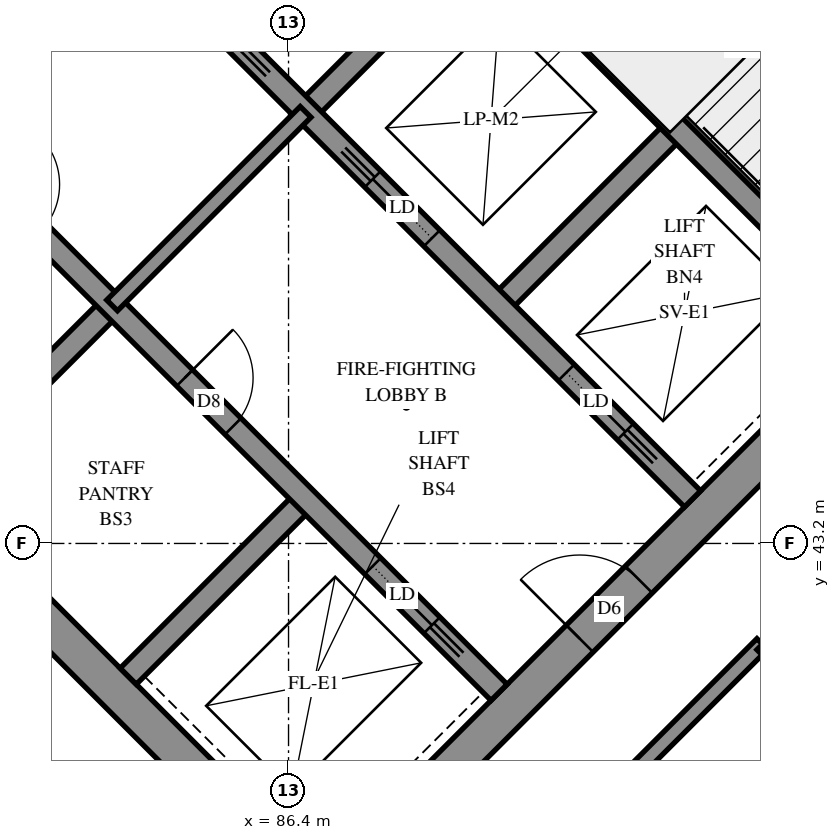
"""IFC4 building model, lengths in metres.
Left out: names, types, materials, properties, quantities, classifications, styles, units other than length and angle.
Written with IfcOpenShell. Run it as: python <this file> out.ifc"""

import sys

from ifc_helpers import new_model, si_unit, direction, frame, frame_2d, origin, place, context, subcontext, project, spatial, rectangle, extrude, element, fill, save


model = new_model("IFC4")
c1 = context("Model", 3, precision=1e-05, world=origin(), true_north=direction((0.0, 1.0)))
c2 = subcontext(c1, "Body", "Model", "MODEL_VIEW")
j1 = project(units=[si_unit("LENGTHUNIT", "METRE"), si_unit("PLANEANGLEUNIT", "RADIAN")], contexts=[c1])
p1 = place(None, origin())
s1 = spatial("IfcSite", under=j1, at=p1, CompositionType="ELEMENT")
p2 = place(p1, origin())
s2 = spatial("IfcBuilding", under=s1, at=p2, CompositionType="ELEMENT")
p3 = place(p2, frame((0.0, 0.0, 189.6)))
s3 = spatial("IfcBuildingStorey", under=s2, at=p3, CompositionType="ELEMENT", Elevation=189.6)
p4 = place(p3, frame((76.124, 49.267, -0.3), z_axis=(0.0, 0.0, 1.0), x_axis=(0.7071067812, -0.7071067812, 0.0)))
e1 = element("IfcWall", 1, at=p4, inside=s3, PredefinedType="SHEAR", context=c2, shape_type="SweptSolid", body=[
    extrude(rectangle(XDim=15.4, YDim=0.5, at=frame_2d((7.7, 0.0))), origin(), (0.0, 0.0, 1.0), 2.7),
])
p5 = place(p3, frame((86.66, 59.802, -0.3), z_axis=(0.0, 0.0, 1.0), x_axis=(0.7071067812, -0.7071067812, 0.0)))
e2 = element("IfcWall", 2, at=p5, inside=s3, PredefinedType="SHEAR", context=c2, shape_type="SweptSolid", body=[
    extrude(rectangle(XDim=15.4, YDim=0.5, at=frame_2d((7.7, 0.0))), origin(), (0.0, 0.0, 1.0), 2.7),
])
p6 = place(p5, frame((10.5, 0.0, 0.3)))
e3 = element("IfcOpeningElement", 3, at=p6, cuts=e2, PredefinedType="OPENING", context=c2, shape_type="SweptSolid", body=[
    extrude(rectangle(XDim=0.8, YDim=2.1, at=frame_2d((0.4, 1.05))), frame((0.0, 0.26, 0.0), z_axis=(0.0, -1.0, 0.0), x_axis=(1.0, 0.0, 0.0)), (0.0, 0.0, 1.0), 0.52),
])
p7 = place(p3, frame((76.478, 49.267, -0.3), z_axis=(0.0, 0.0, 1.0), x_axis=(0.7071067812, 0.7071067812, 0.0)))
e4 = element("IfcWall", 4, at=p7, inside=s3, PredefinedType="SHEAR", context=c2, shape_type="SweptSolid", body=[
    extrude(rectangle(XDim=14.4, YDim=0.5, at=frame_2d((7.2, 0.0))), origin(), (0.0, 0.0, 1.0), 2.7),
])
p8 = place(p7, frame((4.55, 0.0, 0.3)))
e5 = element("IfcOpeningElement", 5, at=p8, cuts=e4, PredefinedType="OPENING", context=c2, shape_type="SweptSolid", body=[
    extrude(rectangle(XDim=1.1, YDim=2.1, at=frame_2d((0.55, 1.05))), frame((0.0, 0.26, 0.0), z_axis=(0.0, -1.0, 0.0), x_axis=(1.0, 0.0, 0.0)), (0.0, 0.0, 1.0), 0.52),
])
p9 = place(p7, frame((11.35, 0.0, 0.3)))
e6 = element("IfcOpeningElement", 6, at=p9, cuts=e4, PredefinedType="OPENING", context=c2, shape_type="SweptSolid", body=[
    extrude(rectangle(XDim=1.1, YDim=2.1, at=frame_2d((0.55, 1.05))), frame((0.0, 0.26, 0.0), z_axis=(0.0, -1.0, 0.0), x_axis=(1.0, 0.0, 0.0)), (0.0, 0.0, 1.0), 0.52),
])
p10 = place(p3, frame((87.013, 38.731, -0.3), z_axis=(0.0, 0.0, 1.0), x_axis=(0.7071067812, 0.7071067812, 0.0)))
e7 = element("IfcWall", 7, at=p10, inside=s3, PredefinedType="SHEAR", context=c2, shape_type="SweptSolid", body=[
    extrude(rectangle(XDim=14.4, YDim=0.5, at=frame_2d((7.2, 0.0))), origin(), (0.0, 0.0, 1.0), 2.7),
])
p11 = place(p10, frame((4.55, 0.0, 0.3)))
e8 = element("IfcOpeningElement", 8, at=p11, cuts=e7, PredefinedType="OPENING", context=c2, shape_type="SweptSolid", body=[
    extrude(rectangle(XDim=1.1, YDim=2.1, at=frame_2d((0.55, 1.05))), frame((0.0, 0.26, 0.0), z_axis=(0.0, -1.0, 0.0), x_axis=(1.0, 0.0, 0.0)), (0.0, 0.0, 1.0), 0.52),
])
p12 = place(p10, frame((11.35, 0.0, 0.3)))
e9 = element("IfcOpeningElement", 9, at=p12, cuts=e7, PredefinedType="OPENING", context=c2, shape_type="SweptSolid", body=[
    extrude(rectangle(XDim=1.1, YDim=2.1, at=frame_2d((0.55, 1.05))), frame((0.0, 0.26, 0.0), z_axis=(0.0, -1.0, 0.0), x_axis=(1.0, 0.0, 0.0)), (0.0, 0.0, 1.0), 0.52),
])
p13 = place(p3, frame((81.746, 43.999, 0.0), z_axis=(0.0, 0.0, 1.0), x_axis=(0.7071067812, 0.7071067812, 0.0)))
e10 = element("IfcWall", 10, at=p13, inside=s3, PredefinedType="SOLIDWALL", context=c2, shape_type="SweptSolid", body=[
    extrude(rectangle(XDim=3.3, YDim=0.3, at=frame_2d((1.65, 0.0))), origin(), (0.0, 0.0, 1.0), 3.1),
])
p14 = place(p3, frame((86.625, 48.878, 0.0), z_axis=(0.0, 0.0, 1.0), x_axis=(0.7071067812, 0.7071067812, 0.0)))
e11 = element("IfcWall", 11, at=p14, inside=s3, PredefinedType="SOLIDWALL", context=c2, shape_type="SweptSolid", body=[
    extrude(rectangle(XDim=3.3, YDim=0.3, at=frame_2d((1.65, 0.0))), origin(), (0.0, 0.0, 1.0), 3.1),
])
p15 = place(p3, frame((84.291, 41.453, 0.0), z_axis=(0.0, 0.0, 1.0), x_axis=(0.7071067812, 0.7071067812, 0.0)))
e12 = element("IfcWall", 12, at=p15, inside=s3, PredefinedType="SOLIDWALL", context=c2, shape_type="SweptSolid", body=[
    extrude(rectangle(XDim=3.3, YDim=0.3, at=frame_2d((1.65, 0.0))), origin(), (0.0, 0.0, 1.0), 3.1),
])
p16 = place(p3, frame((89.17, 46.332, 0.0), z_axis=(0.0, 0.0, 1.0), x_axis=(0.7071067812, 0.7071067812, 0.0)))
e13 = element("IfcWall", 13, at=p16, inside=s3, PredefinedType="SOLIDWALL", context=c2, shape_type="SweptSolid", body=[
    extrude(rectangle(XDim=3.3, YDim=0.3, at=frame_2d((1.65, 0.0))), origin(), (0.0, 0.0, 1.0), 3.1),
])
p17 = place(p3, frame((78.988, 51.423, 0.0), z_axis=(0.0, 0.0, 1.0), x_axis=(0.7071067812, -0.7071067812, 0.0)))
e14 = element("IfcWall", 14, at=p17, inside=s3, PredefinedType="SOLIDWALL", context=c2, shape_type="SweptSolid", body=[
    extrude(rectangle(XDim=14.4, YDim=0.3, at=frame_2d((7.2, 0.0))), origin(), (0.0, 0.0, 1.0), 3.1),
])
p18 = place(p17, frame((1.35, 0.0, 0.0)))
e15 = element("IfcOpeningElement", 15, at=p18, cuts=e14, PredefinedType="OPENING", context=c2, shape_type="SweptSolid", body=[
    extrude(rectangle(XDim=0.9, YDim=2.1, at=frame_2d((0.45, 1.05))), frame((0.0, 0.16, 0.0), z_axis=(0.0, -1.0, 0.0), x_axis=(1.0, 0.0, 0.0)), (0.0, 0.0, 1.0), 0.32),
])
p19 = place(p17, frame((4.95, 0.0, 0.0)))
e16 = element("IfcOpeningElement", 16, at=p19, cuts=e14, PredefinedType="OPENING", context=c2, shape_type="SweptSolid", body=[
    extrude(rectangle(XDim=0.9, YDim=2.1, at=frame_2d((0.45, 1.05))), frame((0.0, 0.16, 0.0), z_axis=(0.0, -1.0, 0.0), x_axis=(1.0, 0.0, 0.0)), (0.0, 0.0, 1.0), 0.32),
])
p20 = place(p17, frame((8.55, 0.0, 0.0)))
e17 = element("IfcOpeningElement", 17, at=p20, cuts=e14, PredefinedType="OPENING", context=c2, shape_type="SweptSolid", body=[
    extrude(rectangle(XDim=0.9, YDim=2.1, at=frame_2d((0.45, 1.05))), frame((0.0, 0.16, 0.0), z_axis=(0.0, -1.0, 0.0), x_axis=(1.0, 0.0, 0.0)), (0.0, 0.0, 1.0), 0.32),
])
p21 = place(p17, frame((12.05, 0.0, 0.0)))
e18 = element("IfcOpeningElement", 18, at=p21, cuts=e14, PredefinedType="OPENING", context=c2, shape_type="SweptSolid", body=[
    extrude(rectangle(XDim=1.1, YDim=2.1, at=frame_2d((0.55, 1.05))), frame((0.0, 0.16, 0.0), z_axis=(0.0, -1.0, 0.0), x_axis=(1.0, 0.0, 0.0)), (0.0, 0.0, 1.0), 0.32),
])
p22 = place(p3, frame((81.534, 53.969, 0.0), z_axis=(0.0, 0.0, 1.0), x_axis=(0.707103309, -0.7071102534, 0.0)))
e19 = element("IfcWall", 19, at=p22, inside=s3, PredefinedType="SOLIDWALL", context=c2, shape_type="SweptSolid", body=[
    extrude(rectangle(XDim=14.4, YDim=0.3, at=frame_2d((7.2, 0.0))), origin(), (0.0, 0.0, 1.0), 3.1),
])
p23 = place(p22, frame((1.25, 0.0, 0.0)))
e20 = element("IfcOpeningElement", 20, at=p23, cuts=e19, PredefinedType="OPENING", context=c2, shape_type="SweptSolid", body=[
    extrude(rectangle(XDim=1.1, YDim=2.1, at=frame_2d((0.55, 1.05))), frame((0.0, 0.16, 0.0), z_axis=(0.0, -1.0, 0.0), x_axis=(1.0, 0.0, 0.0)), (0.0, 0.0, 1.0), 0.32),
])
p24 = place(p22, frame((4.85, 0.0, 0.0)))
e21 = element("IfcOpeningElement", 21, at=p24, cuts=e19, PredefinedType="OPENING", context=c2, shape_type="SweptSolid", body=[
    extrude(rectangle(XDim=1.1, YDim=2.1, at=frame_2d((0.55, 1.05))), frame((0.0, 0.16, 0.0), z_axis=(0.0, -1.0, 0.0), x_axis=(1.0, 0.0, 0.0)), (0.0, 0.0, 1.0), 0.32),
])
p25 = place(p22, frame((8.45, 0.0, 0.0)))
e22 = element("IfcOpeningElement", 22, at=p25, cuts=e19, PredefinedType="OPENING", context=c2, shape_type="SweptSolid", body=[
    extrude(rectangle(XDim=1.1, YDim=2.1, at=frame_2d((0.55, 1.05))), frame((0.0, 0.16, 0.0), z_axis=(0.0, -1.0, 0.0), x_axis=(1.0, 0.0, 0.0)), (0.0, 0.0, 1.0), 0.32),
])
p26 = place(p22, frame((12.05, 0.0, 0.0)))
e23 = element("IfcOpeningElement", 23, at=p26, cuts=e19, PredefinedType="OPENING", context=c2, shape_type="SweptSolid", body=[
    extrude(rectangle(XDim=1.1, YDim=2.1, at=frame_2d((0.55, 1.05))), frame((0.0, 0.16, 0.0), z_axis=(0.0, -1.0, 0.0), x_axis=(1.0, 0.0, 0.0)), (0.0, 0.0, 1.0), 0.32),
])
p27 = place(p3, frame((88.958, 51.211, 0.0), z_axis=(0.0, 0.0, 1.0), x_axis=(0.7070998367, -0.7071137256, 0.0)))
e24 = element("IfcWall", 24, at=p27, inside=s3, PredefinedType="SOLIDWALL", context=c2, shape_type="SweptSolid", body=[
    extrude(rectangle(XDim=7.2, YDim=0.3, at=frame_2d((3.6, 0.0))), origin(), (0.0, 0.0, 1.0), 3.1),
])
p28 = place(p3, frame((91.313, 53.354, 0.0), z_axis=(0.0, 0.0, 1.0), x_axis=(0.7071147811, -0.7070987812, 0.0)))
e25 = element("IfcWall", 25, at=p28, inside=s3, PredefinedType="PARTITIONING", context=c2, shape_type="SweptSolid", body=[
    extrude(rectangle(XDim=6.25, YDim=0.15, at=frame_2d((3.125, 0.0))), origin(), (0.0, 0.0, 1.0), 3.1),
])
p29 = place(p3, frame((84.079, 46.332, 0.0), z_axis=(0.0, 0.0, 1.0), x_axis=(0.7071067812, 0.7071067812, 0.0)))
e26 = element("IfcWall", 26, at=p29, inside=s3, PredefinedType="PARTITIONING", context=c2, shape_type="SweptSolid", body=[
    extrude(rectangle(XDim=3.6, YDim=0.2, at=frame_2d((1.8, 0.0))), origin(), (0.0, 0.0, 1.0), 3.1),
])
p30 = place(p3, frame((86.835, 36.079, 0.0), z_axis=(0.0, 0.0, 1.0), x_axis=(0.7071067812, 0.7071067812, 0.0)))
e27 = element("IfcWall", 27, at=p30, inside=s3, PredefinedType="PARTITIONING", context=c2, shape_type="SweptSolid", body=[
    extrude(rectangle(XDim=8.2, YDim=0.2, at=frame_2d((4.1, 0.0))), origin(), (0.0, 0.0, 1.0), 3.1),
])
p31 = place(p3, frame((80.849, 42.061, 0.0), z_axis=(0.0, 0.0, 1.0), x_axis=(0.7071067812, -0.7071067812, 0.0)))
e28 = element("IfcWall", 28, at=p31, inside=s3, PredefinedType="PARTITIONING", context=c2, shape_type="SweptSolid", body=[
    extrude(rectangle(XDim=6.964, YDim=0.2, at=frame_2d((3.482, 0.0))), origin(), (0.0, 0.0, 1.0), 3.1),
])
p32 = place(p31, frame((5.159, 0.0, 0.0)))
e29 = element("IfcOpeningElement", 29, at=p32, cuts=e28, PredefinedType="OPENING", context=c2, shape_type="SweptSolid", body=[
    extrude(rectangle(XDim=0.9, YDim=2.1, at=frame_2d((0.45, 1.05))), frame((0.0, 0.11, 0.0), z_axis=(0.0, -1.0, 0.0), x_axis=(1.0, 0.0, 0.0)), (0.0, 0.0, 1.0), 0.22),
])
p33 = place(p3, frame((92.633, 41.873, 0.0), z_axis=(0.0, 0.0, 1.0), x_axis=(0.7071067812, -0.7071067812, 0.0)))
e30 = element("IfcWall", 30, at=p33, inside=s3, PredefinedType="PARTITIONING", context=c2, shape_type="SweptSolid", body=[
    extrude(rectangle(XDim=5.199, YDim=0.2, at=frame_2d((2.599, 0.0))), origin(), (0.0, 0.0, 1.0), 3.1),
])
p34 = place(p33, frame((0.253, 0.0, 0.0)))
e31 = element("IfcOpeningElement", 31, at=p34, cuts=e30, PredefinedType="OPENING", context=c2, shape_type="SweptSolid", body=[
    extrude(rectangle(XDim=1.0, YDim=2.1, at=frame_2d((0.5, 1.05))), frame((0.0, 0.11, 0.0), z_axis=(0.0, -1.0, 0.0), x_axis=(1.0, 0.0, 0.0)), (0.0, 0.0, 1.0), 0.22),
])
p35 = place(p33, frame((3.948, 0.0, 0.0)))
e32 = element("IfcOpeningElement", 32, at=p35, cuts=e30, PredefinedType="OPENING", context=c2, shape_type="SweptSolid", body=[
    extrude(rectangle(XDim=0.9, YDim=2.1, at=frame_2d((0.45, 1.05))), frame((0.0, 0.11, 0.0), z_axis=(0.0, -1.0, 0.0), x_axis=(1.0, 0.0, 0.0)), (0.0, 0.0, 1.0), 0.22),
])
p36 = place(p3, frame((92.072, 39.046, 0.0), z_axis=(0.0, 0.0, 1.0), x_axis=(0.706689978, 0.7075233388, 0.0)))
e33 = element("IfcWall", 33, at=p36, inside=s3, PredefinedType="PARTITIONING", context=c2, shape_type="SweptSolid", body=[
    extrude(rectangle(XDim=2.4, YDim=0.15, at=frame_2d((1.2, 0.0))), origin(), (0.0, 0.0, 1.0), 3.1),
])
p37 = place(p11, origin())
e34 = element("IfcDoor", 34, at=p37, inside=s3, OperationType="DOUBLE_DOOR_SINGLE_SWING", PredefinedType="DOOR", context=c2, shape_type="SweptSolid", body=[
    extrude(rectangle(XDim=1.1, YDim=2.1, at=frame_2d((0.55, 1.05))), frame((0.0, 0.025, 0.0), z_axis=(0.0, -1.0, 0.0), x_axis=(1.0, 0.0, 0.0)), (0.0, 0.0, 1.0), 0.05),
])
fill(e8, e34)
p38 = place(p20, origin())
e35 = element("IfcDoor", 35, at=p38, inside=s3, OperationType="SINGLE_SWING_LEFT", PredefinedType="DOOR", context=c2, shape_type="SweptSolid", body=[
    extrude(rectangle(XDim=0.9, YDim=2.1, at=frame_2d((0.45, 1.05))), frame((0.0, 0.025, 0.0), z_axis=(0.0, -1.0, 0.0), x_axis=(1.0, 0.0, 0.0)), (0.0, 0.0, 1.0), 0.05),
])
fill(e17, e35)
p39 = place(p21, origin())
e36 = element("IfcDoor", 36, at=p39, inside=s3, OperationType="SLIDING_TO_RIGHT", PredefinedType="DOOR", context=c2, shape_type="SweptSolid", body=[
    extrude(rectangle(XDim=1.1, YDim=2.1, at=frame_2d((0.55, 1.05))), frame((0.0, 0.025, 0.0), z_axis=(0.0, -1.0, 0.0), x_axis=(1.0, 0.0, 0.0)), (0.0, 0.0, 1.0), 0.05),
])
fill(e18, e36)
p40 = place(p25, origin())
e37 = element("IfcDoor", 37, at=p40, inside=s3, OperationType="SLIDING_TO_LEFT", PredefinedType="DOOR", context=c2, shape_type="SweptSolid", body=[
    extrude(rectangle(XDim=1.1, YDim=2.1, at=frame_2d((0.55, 1.05))), frame((0.0, 0.025, 0.0), z_axis=(0.0, -1.0, 0.0), x_axis=(1.0, 0.0, 0.0)), (0.0, 0.0, 1.0), 0.05),
])
fill(e22, e37)
p41 = place(p26, origin())
e38 = element("IfcDoor", 38, at=p41, inside=s3, OperationType="SLIDING_TO_RIGHT", PredefinedType="DOOR", context=c2, shape_type="SweptSolid", body=[
    extrude(rectangle(XDim=1.1, YDim=2.1, at=frame_2d((0.55, 1.05))), frame((0.0, 0.025, 0.0), z_axis=(0.0, -1.0, 0.0), x_axis=(1.0, 0.0, 0.0)), (0.0, 0.0, 1.0), 0.05),
])
fill(e23, e38)
save(model, sys.argv[1])
